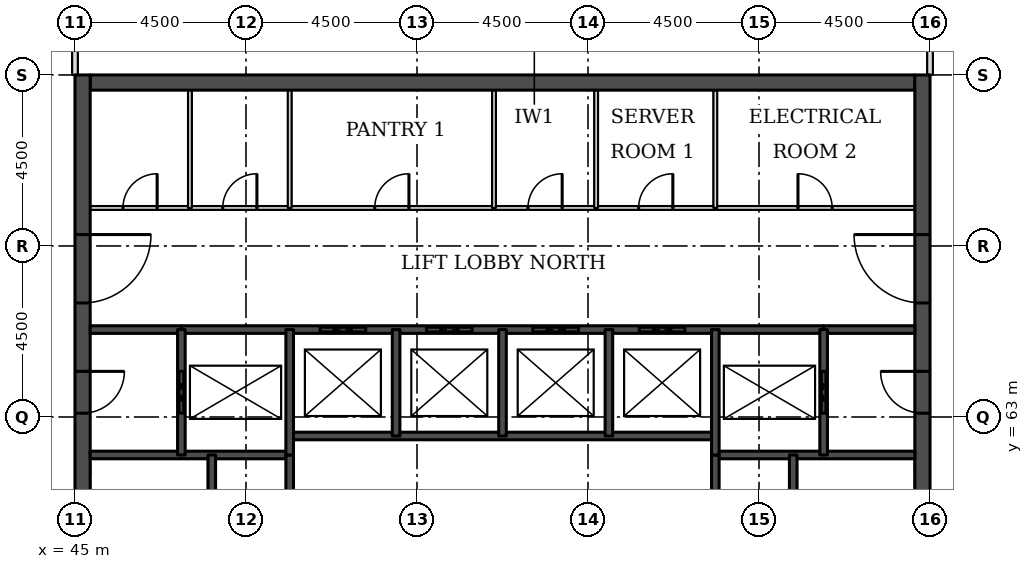
"""IFC4 building model, lengths in metres.
Left out: names, types, materials, properties, quantities, classifications, styles, units other than length and angle.
Written with IfcOpenShell. Run it as: python <this file> out.ifc"""

import sys

from ifc_helpers import new_model, si_unit, direction, frame, frame_2d, origin, place, context, subcontext, project, spatial, rectangle, extrude, element, fill, save


model = new_model("IFC4")
c1 = context("Model", 3, precision=1e-05, world=origin(), true_north=direction((0.0, 1.0)))
c2 = subcontext(c1, "Body", "Model", "MODEL_VIEW")
j1 = project(units=[si_unit("LENGTHUNIT", "METRE"), si_unit("PLANEANGLEUNIT", "RADIAN")], contexts=[c1])
p1 = place(None, origin())
s1 = spatial("IfcSite", under=j1, at=p1, CompositionType="ELEMENT")
p2 = place(p1, origin())
s2 = spatial("IfcBuilding", under=s1, at=p2, CompositionType="ELEMENT")
p3 = place(p2, frame((0.0, 0.0, 256.3)))
s3 = spatial("IfcBuildingStorey", under=s2, at=p3, CompositionType="ELEMENT", Elevation=256.3)
p4 = place(p3, frame((45.4, 71.8, 0.0), z_axis=(0.0, 0.0, 1.0), x_axis=(1.0, 0.0, 0.0)))
e1 = element("IfcWall", 1, at=p4, inside=s3, PredefinedType="SHEAR", context=c2, shape_type="SweptSolid", body=[
    extrude(rectangle(XDim=21.7, YDim=0.4, at=frame_2d((10.85, 0.0))), origin(), (0.0, 0.0, 1.0), 3.7),
])
p5 = place(p3, frame((45.2, 49.5, 0.0), z_axis=(0.0, 0.0, 1.0), x_axis=(0.0, 1.0, 0.0)))
e2 = element("IfcWall", 2, at=p5, inside=s3, PredefinedType="SHEAR", context=c2, shape_type="SweptSolid", body=[
    extrude(rectangle(XDim=22.5, YDim=0.4, at=frame_2d((11.25, 0.0))), origin(), (0.0, 0.0, 1.0), 3.7),
])
p6 = place(p5, frame((4.2, 0.0, 0.0)))
e3 = element("IfcOpeningElement", 3, at=p6, cuts=e2, PredefinedType="OPENING", context=c2, shape_type="SweptSolid", body=[
    extrude(rectangle(XDim=1.8, YDim=2.1, at=frame_2d((0.9, 1.05))), frame((0.0, 0.21, 0.0), z_axis=(0.0, -1.0, 0.0), x_axis=(1.0, 0.0, 0.0)), (0.0, 0.0, 1.0), 0.42),
])
p7 = place(p5, frame((6.9, 0.0, 0.0)))
e4 = element("IfcOpeningElement", 4, at=p7, cuts=e2, PredefinedType="OPENING", context=c2, shape_type="SweptSolid", body=[
    extrude(rectangle(XDim=1.1, YDim=2.1, at=frame_2d((0.55, 1.05))), frame((0.0, 0.21, 0.0), z_axis=(0.0, -1.0, 0.0), x_axis=(1.0, 0.0, 0.0)), (0.0, 0.0, 1.0), 0.42),
])
p8 = place(p5, frame((13.6, 0.0, 0.0)))
e5 = element("IfcOpeningElement", 5, at=p8, cuts=e2, PredefinedType="OPENING", context=c2, shape_type="SweptSolid", body=[
    extrude(rectangle(XDim=1.1, YDim=2.1, at=frame_2d((0.55, 1.05))), frame((0.0, 0.21, 0.0), z_axis=(0.0, -1.0, 0.0), x_axis=(1.0, 0.0, 0.0)), (0.0, 0.0, 1.0), 0.42),
])
p9 = place(p5, frame((16.5, 0.0, 0.0)))
e6 = element("IfcOpeningElement", 6, at=p9, cuts=e2, PredefinedType="OPENING", context=c2, shape_type="SweptSolid", body=[
    extrude(rectangle(XDim=1.8, YDim=2.1, at=frame_2d((0.9, 1.05))), frame((0.0, 0.21, 0.0), z_axis=(0.0, -1.0, 0.0), x_axis=(1.0, 0.0, 0.0)), (0.0, 0.0, 1.0), 0.42),
])
p10 = place(p3, frame((67.3, 49.5, 0.0), z_axis=(0.0, 0.0, 1.0), x_axis=(0.0, 1.0, 0.0)))
e7 = element("IfcWall", 7, at=p10, inside=s3, PredefinedType="SHEAR", context=c2, shape_type="SweptSolid", body=[
    extrude(rectangle(XDim=22.5, YDim=0.4, at=frame_2d((11.25, 0.0))), origin(), (0.0, 0.0, 1.0), 3.7),
])
p11 = place(p10, frame((4.2, 0.0, 0.0)))
e8 = element("IfcOpeningElement", 8, at=p11, cuts=e7, PredefinedType="OPENING", context=c2, shape_type="SweptSolid", body=[
    extrude(rectangle(XDim=1.8, YDim=2.1, at=frame_2d((0.9, 1.05))), frame((0.0, 0.21, 0.0), z_axis=(0.0, -1.0, 0.0), x_axis=(1.0, 0.0, 0.0)), (0.0, 0.0, 1.0), 0.42),
])
p12 = place(p10, frame((6.9, 0.0, 0.0)))
e9 = element("IfcOpeningElement", 9, at=p12, cuts=e7, PredefinedType="OPENING", context=c2, shape_type="SweptSolid", body=[
    extrude(rectangle(XDim=1.1, YDim=2.1, at=frame_2d((0.55, 1.05))), frame((0.0, 0.21, 0.0), z_axis=(0.0, -1.0, 0.0), x_axis=(1.0, 0.0, 0.0)), (0.0, 0.0, 1.0), 0.42),
])
p13 = place(p10, frame((13.6, 0.0, 0.0)))
e10 = element("IfcOpeningElement", 10, at=p13, cuts=e7, PredefinedType="OPENING", context=c2, shape_type="SweptSolid", body=[
    extrude(rectangle(XDim=1.1, YDim=2.1, at=frame_2d((0.55, 1.05))), frame((0.0, 0.21, 0.0), z_axis=(0.0, -1.0, 0.0), x_axis=(1.0, 0.0, 0.0)), (0.0, 0.0, 1.0), 0.42),
])
p14 = place(p10, frame((16.5, 0.0, 0.0)))
e11 = element("IfcOpeningElement", 11, at=p14, cuts=e7, PredefinedType="OPENING", context=c2, shape_type="SweptSolid", body=[
    extrude(rectangle(XDim=1.8, YDim=2.1, at=frame_2d((0.9, 1.05))), frame((0.0, 0.21, 0.0), z_axis=(0.0, -1.0, 0.0), x_axis=(1.0, 0.0, 0.0)), (0.0, 0.0, 1.0), 0.42),
])
p15 = place(p3, frame((45.0, 72.0, 0.0), z_axis=(0.0, 0.0, 1.0), x_axis=(0.0, 1.0, 0.0)))
e12 = element("IfcWall", 12, at=p15, inside=s3, PredefinedType="PARTITIONING", context=c2, shape_type="SweptSolid", body=[
    extrude(rectangle(XDim=3.0, YDim=0.15, at=frame_2d((1.5, 0.0))), origin(), (0.0, 0.0, 1.0), 3.022),
])
p16 = place(p3, frame((67.5, 72.0, 0.0), z_axis=(0.0, 0.0, 1.0), x_axis=(0.0, 1.0, 0.0)))
e13 = element("IfcWall", 13, at=p16, inside=s3, PredefinedType="PARTITIONING", context=c2, shape_type="SweptSolid", body=[
    extrude(rectangle(XDim=9.45, YDim=0.15, at=frame_2d((4.725, 0.0))), origin(), (0.0, 0.0, 1.0), 3.022),
])
for number, where, z_axis, x_axis in (
    (14, (45.4, 62.0, 0.0), (0.0, 0.0, 1.0), (1.0, 0.0, 0.0)),
    (15, (61.85, 62.0, 0.0), (0.0, 0.0, 1.0), (1.0, 0.0, 0.0)),
):
    element("IfcWall", number, at=place(p3, frame(where, z_axis=z_axis, x_axis=x_axis)), inside=s3, PredefinedType="SOLIDWALL", context=c2, shape_type="SweptSolid", body=[
        extrude(rectangle(XDim=5.25, YDim=0.2, at=frame_2d((2.625, 0.0))), origin(), (0.0, 0.0, 1.0), 3.55),
    ])
p17 = place(p3, frame((50.65, 62.5, 0.0), z_axis=(0.0, 0.0, 1.0), x_axis=(1.0, 0.0, 0.0)))
e16 = element("IfcWall", 16, at=p17, inside=s3, PredefinedType="SOLIDWALL", context=c2, shape_type="SweptSolid", body=[
    extrude(rectangle(XDim=11.2, YDim=0.2, at=frame_2d((5.6, 0.0))), origin(), (0.0, 0.0, 1.0), 3.7),
])
for number, where, z_axis, x_axis in (
    (17, (45.4, 65.3, 0.0), (0.0, 0.0, 1.0), (1.0, 0.0, 0.0)),
    (18, (64.7, 65.3, 0.0), (0.0, 0.0, 1.0), (1.0, 0.0, 0.0)),
):
    element("IfcWall", number, at=place(p3, frame(where, z_axis=z_axis, x_axis=x_axis)), inside=s3, PredefinedType="SOLIDWALL", context=c2, shape_type="SweptSolid", body=[
        extrude(rectangle(XDim=2.4, YDim=0.2, at=frame_2d((1.2, 0.0))), origin(), (0.0, 0.0, 1.0), 3.55),
    ])
p18 = place(p3, frame((47.8, 65.3, 0.0), z_axis=(0.0, 0.0, 1.0), x_axis=(1.0, 0.0, 0.0)))
e19 = element("IfcWall", 19, at=p18, inside=s3, PredefinedType="SOLIDWALL", context=c2, shape_type="SweptSolid", body=[
    extrude(rectangle(XDim=16.9, YDim=0.2, at=frame_2d((8.45, 0.0))), origin(), (0.0, 0.0, 1.0), 3.55),
])
p19 = place(p18, frame((3.65, 0.0, 0.0)))
e20 = element("IfcOpeningElement", 20, at=p19, cuts=e19, PredefinedType="OPENING", context=c2, shape_type="SweptSolid", body=[
    extrude(rectangle(XDim=1.2, YDim=2.1, at=frame_2d((0.6, 1.05))), frame((0.0, 0.11, 0.0), z_axis=(0.0, -1.0, 0.0), x_axis=(1.0, 0.0, 0.0)), (0.0, 0.0, 1.0), 0.22),
])
p20 = place(p18, frame((6.45, 0.0, 0.0)))
e21 = element("IfcOpeningElement", 21, at=p20, cuts=e19, PredefinedType="OPENING", context=c2, shape_type="SweptSolid", body=[
    extrude(rectangle(XDim=1.2, YDim=2.1, at=frame_2d((0.6, 1.05))), frame((0.0, 0.11, 0.0), z_axis=(0.0, -1.0, 0.0), x_axis=(1.0, 0.0, 0.0)), (0.0, 0.0, 1.0), 0.22),
])
p21 = place(p18, frame((9.25, 0.0, 0.0)))
e22 = element("IfcOpeningElement", 22, at=p21, cuts=e19, PredefinedType="OPENING", context=c2, shape_type="SweptSolid", body=[
    extrude(rectangle(XDim=1.2, YDim=2.1, at=frame_2d((0.6, 1.05))), frame((0.0, 0.11, 0.0), z_axis=(0.0, -1.0, 0.0), x_axis=(1.0, 0.0, 0.0)), (0.0, 0.0, 1.0), 0.22),
])
p22 = place(p18, frame((12.05, 0.0, 0.0)))
e23 = element("IfcOpeningElement", 23, at=p22, cuts=e19, PredefinedType="OPENING", context=c2, shape_type="SweptSolid", body=[
    extrude(rectangle(XDim=1.2, YDim=2.1, at=frame_2d((0.6, 1.05))), frame((0.0, 0.11, 0.0), z_axis=(0.0, -1.0, 0.0), x_axis=(1.0, 0.0, 0.0)), (0.0, 0.0, 1.0), 0.22),
])
p23 = place(p3, frame((45.4, 68.5, 0.0), z_axis=(0.0, 0.0, 1.0), x_axis=(1.0, 0.0, 0.0)))
e24 = element("IfcWall", 24, at=p23, inside=s3, PredefinedType="PARTITIONING", context=c2, shape_type="SweptSolid", body=[
    extrude(rectangle(XDim=21.7, YDim=0.1, at=frame_2d((10.85, 0.0))), origin(), (0.0, 0.0, 1.0), 3.55),
])
p24 = place(p23, frame((18.625, 0.0, 0.0)))
e25 = element("IfcOpeningElement", 25, at=p24, cuts=e24, PredefinedType="OPENING", context=c2, shape_type="SweptSolid", body=[
    extrude(rectangle(XDim=0.9, YDim=2.1, at=frame_2d((0.45, 1.05))), frame((0.0, 0.06, 0.0), z_axis=(0.0, -1.0, 0.0), x_axis=(1.0, 0.0, 0.0)), (0.0, 0.0, 1.0), 0.12),
])
p25 = place(p23, frame((0.863, 0.0, 0.0)))
e26 = element("IfcOpeningElement", 26, at=p25, cuts=e24, PredefinedType="OPENING", context=c2, shape_type="SweptSolid", body=[
    extrude(rectangle(XDim=0.9, YDim=2.1, at=frame_2d((0.45, 1.05))), frame((0.0, 0.06, 0.0), z_axis=(0.0, -1.0, 0.0), x_axis=(1.0, 0.0, 0.0)), (0.0, 0.0, 1.0), 0.12),
])
p26 = place(p23, frame((3.488, 0.0, 0.0)))
e27 = element("IfcOpeningElement", 27, at=p26, cuts=e24, PredefinedType="OPENING", context=c2, shape_type="SweptSolid", body=[
    extrude(rectangle(XDim=0.9, YDim=2.1, at=frame_2d((0.45, 1.05))), frame((0.0, 0.06, 0.0), z_axis=(0.0, -1.0, 0.0), x_axis=(1.0, 0.0, 0.0)), (0.0, 0.0, 1.0), 0.12),
])
p27 = place(p23, frame((14.432, 0.0, 0.0)))
e28 = element("IfcOpeningElement", 28, at=p27, cuts=e24, PredefinedType="OPENING", context=c2, shape_type="SweptSolid", body=[
    extrude(rectangle(XDim=0.9, YDim=2.1, at=frame_2d((0.45, 1.05))), frame((0.0, 0.06, 0.0), z_axis=(0.0, -1.0, 0.0), x_axis=(1.0, 0.0, 0.0)), (0.0, 0.0, 1.0), 0.12),
])
p28 = place(p23, frame((11.52, 0.0, 0.0)))
e29 = element("IfcOpeningElement", 29, at=p28, cuts=e24, PredefinedType="OPENING", context=c2, shape_type="SweptSolid", body=[
    extrude(rectangle(XDim=0.9, YDim=2.1, at=frame_2d((0.45, 1.05))), frame((0.0, 0.06, 0.0), z_axis=(0.0, -1.0, 0.0), x_axis=(1.0, 0.0, 0.0)), (0.0, 0.0, 1.0), 0.12),
])
p29 = place(p23, frame((7.488, 0.0, 0.0)))
e30 = element("IfcOpeningElement", 30, at=p29, cuts=e24, PredefinedType="OPENING", context=c2, shape_type="SweptSolid", body=[
    extrude(rectangle(XDim=0.9, YDim=2.1, at=frame_2d((0.45, 1.05))), frame((0.0, 0.06, 0.0), z_axis=(0.0, -1.0, 0.0), x_axis=(1.0, 0.0, 0.0)), (0.0, 0.0, 1.0), 0.12),
])
p30 = place(p3, frame((47.8, 62.0, 0.0), z_axis=(0.0, 0.0, 1.0), x_axis=(0.0, 1.0, 0.0)))
e31 = element("IfcWall", 31, at=p30, inside=s3, PredefinedType="SOLIDWALL", context=c2, shape_type="SweptSolid", body=[
    extrude(rectangle(XDim=3.3, YDim=0.2, at=frame_2d((1.65, 0.0))), origin(), (0.0, 0.0, 1.0), 3.55),
])
p31 = place(p30, frame((1.1, 0.0, 0.0)))
e32 = element("IfcOpeningElement", 32, at=p31, cuts=e31, PredefinedType="OPENING", context=c2, shape_type="SweptSolid", body=[
    extrude(rectangle(XDim=1.1, YDim=2.1, at=frame_2d((0.55, 1.05))), frame((0.0, 0.11, 0.0), z_axis=(0.0, -1.0, 0.0), x_axis=(1.0, 0.0, 0.0)), (0.0, 0.0, 1.0), 0.22),
])
p32 = place(p3, frame((48.025, 68.5, 0.0), z_axis=(0.0, 0.0, 1.0), x_axis=(0.0, 1.0, 0.0)))
e33 = element("IfcWall", 33, at=p32, inside=s3, PredefinedType="PARTITIONING", context=c2, shape_type="SweptSolid", body=[
    extrude(rectangle(XDim=3.1, YDim=0.1, at=frame_2d((1.55, 0.0))), origin(), (0.0, 0.0, 1.0), 3.55),
])
p33 = place(p3, frame((48.6, 56.2, 0.0), z_axis=(0.0, 0.0, 1.0), x_axis=(0.0, 1.0, 0.0)))
e34 = element("IfcWall", 34, at=p33, inside=s3, PredefinedType="SOLIDWALL", context=c2, shape_type="SweptSolid", body=[
    extrude(rectangle(XDim=5.8, YDim=0.2, at=frame_2d((2.9, 0.0))), origin(), (0.0, 0.0, 1.0), 3.55),
])
p34 = place(p3, frame((50.65, 68.5, 0.0), z_axis=(0.0, 0.0, 1.0), x_axis=(0.0, 1.0, 0.0)))
e35 = element("IfcWall", 35, at=p34, inside=s3, PredefinedType="PARTITIONING", context=c2, shape_type="SweptSolid", body=[
    extrude(rectangle(XDim=3.1, YDim=0.1, at=frame_2d((1.55, 0.0))), origin(), (0.0, 0.0, 1.0), 3.55),
])
p35 = place(p3, frame((50.65, 59.0, 0.0), z_axis=(0.0, 0.0, 1.0), x_axis=(0.0, 1.0, 0.0)))
e36 = element("IfcWall", 36, at=p35, inside=s3, PredefinedType="SOLIDWALL", context=c2, shape_type="SweptSolid", body=[
    extrude(rectangle(XDim=3.0, YDim=0.2, at=frame_2d((1.5, 0.0))), origin(), (0.0, 0.0, 1.0), 3.7),
])
p36 = place(p3, frame((50.65, 62.0, 0.0), z_axis=(0.0, 0.0, 1.0), x_axis=(0.0, 1.0, 0.0)))
e37 = element("IfcWall", 37, at=p36, inside=s3, PredefinedType="SOLIDWALL", context=c2, shape_type="SweptSolid", body=[
    extrude(rectangle(XDim=3.3, YDim=0.2, at=frame_2d((1.65, 0.0))), origin(), (0.0, 0.0, 1.0), 3.55),
])
p37 = place(p3, frame((53.45, 62.5, 0.0), z_axis=(0.0, 0.0, 1.0), x_axis=(0.0, 1.0, 0.0)))
e38 = element("IfcWall", 38, at=p37, inside=s3, PredefinedType="SOLIDWALL", context=c2, shape_type="SweptSolid", body=[
    extrude(rectangle(XDim=2.8, YDim=0.2, at=frame_2d((1.4, 0.0))), origin(), (0.0, 0.0, 1.0), 3.55),
])
p38 = place(p3, frame((56.026, 68.5, 0.0), z_axis=(0.0, 0.0, 1.0), x_axis=(0.0, 1.0, 0.0)))
e39 = element("IfcWall", 39, at=p38, inside=s3, PredefinedType="PARTITIONING", context=c2, shape_type="SweptSolid", body=[
    extrude(rectangle(XDim=3.1, YDim=0.1, at=frame_2d((1.55, 0.0))), origin(), (0.0, 0.0, 1.0), 3.55),
])
p39 = place(p3, frame((56.25, 62.5, 0.0), z_axis=(0.0, 0.0, 1.0), x_axis=(0.0, 1.0, 0.0)))
e40 = element("IfcWall", 40, at=p39, inside=s3, PredefinedType="SOLIDWALL", context=c2, shape_type="SweptSolid", body=[
    extrude(rectangle(XDim=2.8, YDim=0.2, at=frame_2d((1.4, 0.0))), origin(), (0.0, 0.0, 1.0), 3.55),
])
p40 = place(p3, frame((58.714, 68.5, 0.0), z_axis=(0.0, 0.0, 1.0), x_axis=(0.0, 1.0, 0.0)))
e41 = element("IfcWall", 41, at=p40, inside=s3, PredefinedType="PARTITIONING", context=c2, shape_type="SweptSolid", body=[
    extrude(rectangle(XDim=3.1, YDim=0.1, at=frame_2d((1.55, 0.0))), origin(), (0.0, 0.0, 1.0), 3.55),
])
p41 = place(p3, frame((59.05, 62.5, 0.0), z_axis=(0.0, 0.0, 1.0), x_axis=(0.0, 1.0, 0.0)))
e42 = element("IfcWall", 42, at=p41, inside=s3, PredefinedType="SOLIDWALL", context=c2, shape_type="SweptSolid", body=[
    extrude(rectangle(XDim=2.8, YDim=0.2, at=frame_2d((1.4, 0.0))), origin(), (0.0, 0.0, 1.0), 3.55),
])
p42 = place(p3, frame((61.85, 68.5, 0.0), z_axis=(0.0, 0.0, 1.0), x_axis=(0.0, 1.0, 0.0)))
e43 = element("IfcWall", 43, at=p42, inside=s3, PredefinedType="PARTITIONING", context=c2, shape_type="SweptSolid", body=[
    extrude(rectangle(XDim=3.1, YDim=0.1, at=frame_2d((1.55, 0.0))), origin(), (0.0, 0.0, 1.0), 3.55),
])
p43 = place(p3, frame((61.85, 59.0, 0.0), z_axis=(0.0, 0.0, 1.0), x_axis=(0.0, 1.0, 0.0)))
e44 = element("IfcWall", 44, at=p43, inside=s3, PredefinedType="SOLIDWALL", context=c2, shape_type="SweptSolid", body=[
    extrude(rectangle(XDim=3.0, YDim=0.2, at=frame_2d((1.5, 0.0))), origin(), (0.0, 0.0, 1.0), 3.7),
])
p44 = place(p3, frame((61.85, 62.0, 0.0), z_axis=(0.0, 0.0, 1.0), x_axis=(0.0, 1.0, 0.0)))
e45 = element("IfcWall", 45, at=p44, inside=s3, PredefinedType="SOLIDWALL", context=c2, shape_type="SweptSolid", body=[
    extrude(rectangle(XDim=3.3, YDim=0.2, at=frame_2d((1.65, 0.0))), origin(), (0.0, 0.0, 1.0), 3.55),
])
p45 = place(p3, frame((63.9, 56.2, 0.0), z_axis=(0.0, 0.0, 1.0), x_axis=(0.0, 1.0, 0.0)))
e46 = element("IfcWall", 46, at=p45, inside=s3, PredefinedType="SOLIDWALL", context=c2, shape_type="SweptSolid", body=[
    extrude(rectangle(XDim=5.8, YDim=0.2, at=frame_2d((2.9, 0.0))), origin(), (0.0, 0.0, 1.0), 3.55),
])
p46 = place(p3, frame((64.7, 62.0, 0.0), z_axis=(0.0, 0.0, 1.0), x_axis=(0.0, 1.0, 0.0)))
e47 = element("IfcWall", 47, at=p46, inside=s3, PredefinedType="SOLIDWALL", context=c2, shape_type="SweptSolid", body=[
    extrude(rectangle(XDim=3.3, YDim=0.2, at=frame_2d((1.65, 0.0))), origin(), (0.0, 0.0, 1.0), 3.55),
])
p47 = place(p46, frame((1.1, 0.0, 0.0)))
e48 = element("IfcOpeningElement", 48, at=p47, cuts=e47, PredefinedType="OPENING", context=c2, shape_type="SweptSolid", body=[
    extrude(rectangle(XDim=1.1, YDim=2.1, at=frame_2d((0.55, 1.05))), frame((0.0, 0.11, 0.0), z_axis=(0.0, -1.0, 0.0), x_axis=(1.0, 0.0, 0.0)), (0.0, 0.0, 1.0), 0.22),
])
p48 = place(p19, origin())
e49 = element("IfcDoor", 49, at=p48, inside=s3, OperationType="DOUBLE_DOOR_SLIDING", PredefinedType="DOOR", context=c2, shape_type="SweptSolid", body=[
    extrude(rectangle(XDim=1.2, YDim=2.1, at=frame_2d((0.6, 1.05))), frame((0.0, 0.025, 0.0), z_axis=(0.0, -1.0, 0.0), x_axis=(1.0, 0.0, 0.0)), (0.0, 0.0, 1.0), 0.05),
])
fill(e20, e49)
p49 = place(p20, origin())
e50 = element("IfcDoor", 50, at=p49, inside=s3, OperationType="DOUBLE_DOOR_SLIDING", PredefinedType="DOOR", context=c2, shape_type="SweptSolid", body=[
    extrude(rectangle(XDim=1.2, YDim=2.1, at=frame_2d((0.6, 1.05))), frame((0.0, 0.025, 0.0), z_axis=(0.0, -1.0, 0.0), x_axis=(1.0, 0.0, 0.0)), (0.0, 0.0, 1.0), 0.05),
])
fill(e21, e50)
p50 = place(p21, origin())
e51 = element("IfcDoor", 51, at=p50, inside=s3, OperationType="DOUBLE_DOOR_SLIDING", PredefinedType="DOOR", context=c2, shape_type="SweptSolid", body=[
    extrude(rectangle(XDim=1.2, YDim=2.1, at=frame_2d((0.6, 1.05))), frame((0.0, 0.025, 0.0), z_axis=(0.0, -1.0, 0.0), x_axis=(1.0, 0.0, 0.0)), (0.0, 0.0, 1.0), 0.05),
])
fill(e22, e51)
p51 = place(p22, origin())
e52 = element("IfcDoor", 52, at=p51, inside=s3, OperationType="DOUBLE_DOOR_SLIDING", PredefinedType="DOOR", context=c2, shape_type="SweptSolid", body=[
    extrude(rectangle(XDim=1.2, YDim=2.1, at=frame_2d((0.6, 1.05))), frame((0.0, 0.025, 0.0), z_axis=(0.0, -1.0, 0.0), x_axis=(1.0, 0.0, 0.0)), (0.0, 0.0, 1.0), 0.05),
])
fill(e23, e52)
p52 = place(p31, origin())
e53 = element("IfcDoor", 53, at=p52, inside=s3, OperationType="DOUBLE_DOOR_SLIDING", PredefinedType="DOOR", context=c2, shape_type="SweptSolid", body=[
    extrude(rectangle(XDim=1.1, YDim=2.1, at=frame_2d((0.55, 1.05))), frame((0.0, 0.025, 0.0), z_axis=(0.0, -1.0, 0.0), x_axis=(1.0, 0.0, 0.0)), (0.0, 0.0, 1.0), 0.05),
])
fill(e32, e53)
p53 = place(p47, origin())
e54 = element("IfcDoor", 54, at=p53, inside=s3, OperationType="DOUBLE_DOOR_SLIDING", PredefinedType="DOOR", context=c2, shape_type="SweptSolid", body=[
    extrude(rectangle(XDim=1.1, YDim=2.1, at=frame_2d((0.55, 1.05))), frame((0.0, 0.025, 0.0), z_axis=(0.0, -1.0, 0.0), x_axis=(1.0, 0.0, 0.0)), (0.0, 0.0, 1.0), 0.05),
])
fill(e48, e54)
p54 = place(p8, frame((1.1, 0.0, 0.0), z_axis=(0.0, 0.0, 1.0), x_axis=(-1.0, 0.0, 0.0)))
e55 = element("IfcDoor", 55, at=p54, inside=s3, OperationType="SINGLE_SWING_LEFT", PredefinedType="DOOR", context=c2, shape_type="SweptSolid", body=[
    extrude(rectangle(XDim=1.1, YDim=2.1, at=frame_2d((0.55, 1.05))), frame((0.0, 0.025, 0.0), z_axis=(0.0, -1.0, 0.0), x_axis=(1.0, 0.0, 0.0)), (0.0, 0.0, 1.0), 0.05),
])
fill(e5, e55)
p55 = place(p9, frame((1.8, 0.0, 0.0), z_axis=(0.0, 0.0, 1.0), x_axis=(-1.0, 0.0, 0.0)))
e56 = element("IfcDoor", 56, at=p55, inside=s3, OperationType="SINGLE_SWING_LEFT", PredefinedType="DOOR", context=c2, shape_type="SweptSolid", body=[
    extrude(rectangle(XDim=1.8, YDim=2.1, at=frame_2d((0.9, 1.05))), frame((0.0, 0.025, 0.0), z_axis=(0.0, -1.0, 0.0), x_axis=(1.0, 0.0, 0.0)), (0.0, 0.0, 1.0), 0.05),
])
fill(e6, e56)
p56 = place(p13, origin())
e57 = element("IfcDoor", 57, at=p56, inside=s3, OperationType="SINGLE_SWING_RIGHT", PredefinedType="DOOR", context=c2, shape_type="SweptSolid", body=[
    extrude(rectangle(XDim=1.1, YDim=2.1, at=frame_2d((0.55, 1.05))), frame((0.0, 0.025, 0.0), z_axis=(0.0, -1.0, 0.0), x_axis=(1.0, 0.0, 0.0)), (0.0, 0.0, 1.0), 0.05),
])
fill(e10, e57)
p57 = place(p14, origin())
e58 = element("IfcDoor", 58, at=p57, inside=s3, OperationType="SINGLE_SWING_RIGHT", PredefinedType="DOOR", context=c2, shape_type="SweptSolid", body=[
    extrude(rectangle(XDim=1.8, YDim=2.1, at=frame_2d((0.9, 1.05))), frame((0.0, 0.025, 0.0), z_axis=(0.0, -1.0, 0.0), x_axis=(1.0, 0.0, 0.0)), (0.0, 0.0, 1.0), 0.05),
])
fill(e11, e58)
p58 = place(p24, origin())
e59 = element("IfcDoor", 59, at=p58, inside=s3, OperationType="SINGLE_SWING_LEFT", PredefinedType="DOOR", context=c2, shape_type="SweptSolid", body=[
    extrude(rectangle(XDim=0.9, YDim=2.1, at=frame_2d((0.45, 1.05))), frame((0.0, 0.025, 0.0), z_axis=(0.0, -1.0, 0.0), x_axis=(1.0, 0.0, 0.0)), (0.0, 0.0, 1.0), 0.05),
])
fill(e25, e59)
p59 = place(p25, origin())
e60 = element("IfcDoor", 60, at=p59, inside=s3, OperationType="SINGLE_SWING_RIGHT", PredefinedType="DOOR", context=c2, shape_type="SweptSolid", body=[
    extrude(rectangle(XDim=0.9, YDim=2.1, at=frame_2d((0.45, 1.05))), frame((0.0, 0.025, 0.0), z_axis=(0.0, -1.0, 0.0), x_axis=(1.0, 0.0, 0.0)), (0.0, 0.0, 1.0), 0.05),
])
fill(e26, e60)
p60 = place(p26, origin())
e61 = element("IfcDoor", 61, at=p60, inside=s3, OperationType="SINGLE_SWING_RIGHT", PredefinedType="DOOR", context=c2, shape_type="SweptSolid", body=[
    extrude(rectangle(XDim=0.9, YDim=2.1, at=frame_2d((0.45, 1.05))), frame((0.0, 0.025, 0.0), z_axis=(0.0, -1.0, 0.0), x_axis=(1.0, 0.0, 0.0)), (0.0, 0.0, 1.0), 0.05),
])
fill(e27, e61)
p61 = place(p27, origin())
e62 = element("IfcDoor", 62, at=p61, inside=s3, OperationType="SINGLE_SWING_RIGHT", PredefinedType="DOOR", context=c2, shape_type="SweptSolid", body=[
    extrude(rectangle(XDim=0.9, YDim=2.1, at=frame_2d((0.45, 1.05))), frame((0.0, 0.025, 0.0), z_axis=(0.0, -1.0, 0.0), x_axis=(1.0, 0.0, 0.0)), (0.0, 0.0, 1.0), 0.05),
])
fill(e28, e62)
p62 = place(p28, origin())
e63 = element("IfcDoor", 63, at=p62, inside=s3, OperationType="SINGLE_SWING_RIGHT", PredefinedType="DOOR", context=c2, shape_type="SweptSolid", body=[
    extrude(rectangle(XDim=0.9, YDim=2.1, at=frame_2d((0.45, 1.05))), frame((0.0, 0.025, 0.0), z_axis=(0.0, -1.0, 0.0), x_axis=(1.0, 0.0, 0.0)), (0.0, 0.0, 1.0), 0.05),
])
fill(e29, e63)
p63 = place(p29, origin())
e64 = element("IfcDoor", 64, at=p63, inside=s3, OperationType="SINGLE_SWING_RIGHT", PredefinedType="DOOR", context=c2, shape_type="SweptSolid", body=[
    extrude(rectangle(XDim=0.9, YDim=2.1, at=frame_2d((0.45, 1.05))), frame((0.0, 0.025, 0.0), z_axis=(0.0, -1.0, 0.0), x_axis=(1.0, 0.0, 0.0)), (0.0, 0.0, 1.0), 0.05),
])
fill(e30, e64)
save(model, sys.argv[1])
